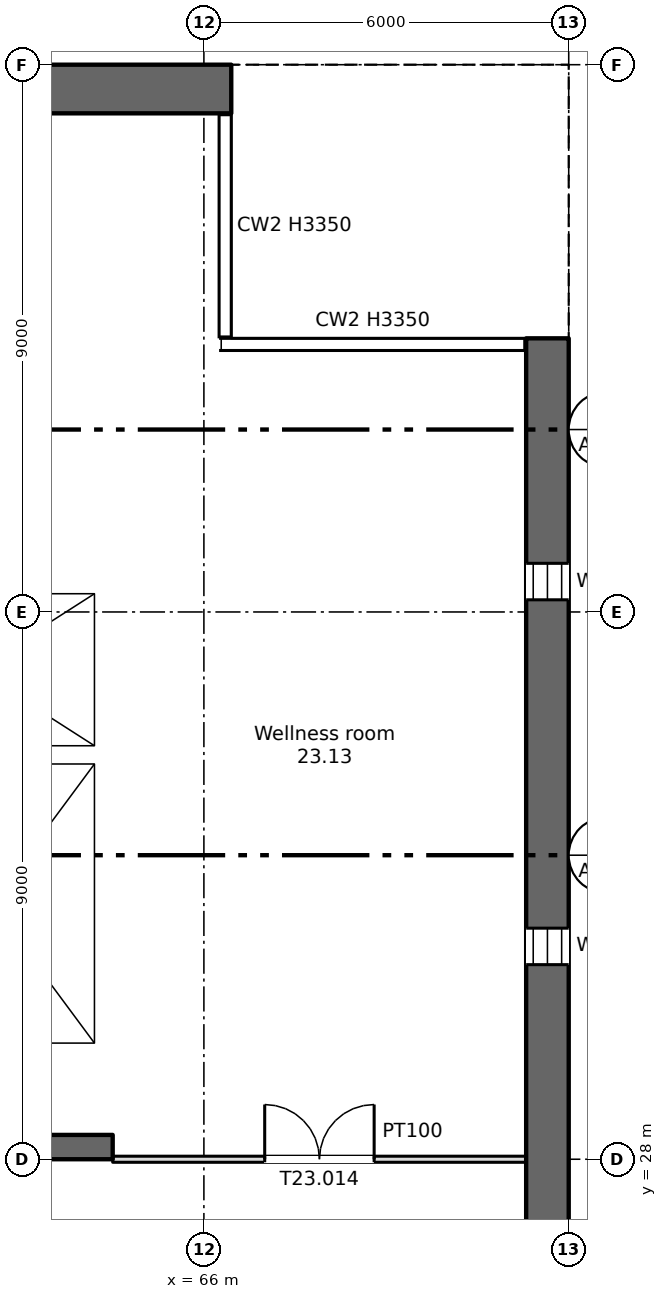
"""IFC4 building model, lengths in metres.
Left out: names, types, materials, properties, quantities, classifications, styles, units other than length and angle.
Written with IfcOpenShell. Run it as: python <this file> out.ifc"""

import sys

from ifc_helpers import new_model, si_unit, direction, frame, frame_2d, origin, place, context, subcontext, project, spatial, rectangle, extrude, element, fill, save


model = new_model("IFC4")
c1 = context("Model", 3, precision=1e-05, world=origin(), true_north=direction((0.0, 1.0)))
c2 = subcontext(c1, "Body", "Model", "MODEL_VIEW")
j1 = project(units=[si_unit("LENGTHUNIT", "METRE"), si_unit("PLANEANGLEUNIT", "RADIAN")], contexts=[c1])
p1 = place(None, origin())
s1 = spatial("IfcSite", under=j1, at=p1, CompositionType="ELEMENT")
p2 = place(p1, origin())
s2 = spatial("IfcBuilding", under=s1, at=p2, CompositionType="ELEMENT")
p3 = place(p2, frame((0.0, 0.0, 151.25)))
s3 = spatial("IfcBuildingStorey", under=s2, at=p3, CompositionType="ELEMENT", Elevation=151.25)
p4 = place(p3, frame((71.65, 6.0, 0.0), z_axis=(0.0, 0.0, 1.0), x_axis=(0.0, 1.0, 0.0)))
e1 = element("IfcWall", 1, at=p4, inside=s3, PredefinedType="SHEAR", context=c2, shape_type="SweptSolid", body=[
    extrude(rectangle(XDim=35.5, YDim=0.7, at=frame_2d((17.75, 0.0))), origin(), (0.0, 0.0, 1.0), 3.35),
])
p5 = place(p4, frame((1.2, 0.0, 0.6)))
e2 = element("IfcOpeningElement", 2, at=p5, cuts=e1, PredefinedType="OPENING", context=c2, shape_type="SweptSolid", body=[
    extrude(rectangle(XDim=0.6, YDim=2.4, at=frame_2d((0.3, 1.2))), frame((0.0, 0.36, 0.0), z_axis=(0.0, -1.0, 0.0), x_axis=(1.0, 0.0, 0.0)), (0.0, 0.0, 1.0), 0.72),
])
p6 = place(p4, frame((7.2, 0.0, 0.6)))
e3 = element("IfcOpeningElement", 3, at=p6, cuts=e1, PredefinedType="OPENING", context=c2, shape_type="SweptSolid", body=[
    extrude(rectangle(XDim=0.6, YDim=2.4, at=frame_2d((0.3, 1.2))), frame((0.0, 0.36, 0.0), z_axis=(0.0, -1.0, 0.0), x_axis=(1.0, 0.0, 0.0)), (0.0, 0.0, 1.0), 0.72),
])
p7 = place(p4, frame((13.2, 0.0, 0.6)))
e4 = element("IfcOpeningElement", 4, at=p7, cuts=e1, PredefinedType="OPENING", context=c2, shape_type="SweptSolid", body=[
    extrude(rectangle(XDim=0.6, YDim=2.4, at=frame_2d((0.3, 1.2))), frame((0.0, 0.36, 0.0), z_axis=(0.0, -1.0, 0.0), x_axis=(1.0, 0.0, 0.0)), (0.0, 0.0, 1.0), 0.72),
])
p8 = place(p4, frame((19.2, 0.0, 0.6)))
e5 = element("IfcOpeningElement", 5, at=p8, cuts=e1, PredefinedType="OPENING", context=c2, shape_type="SweptSolid", body=[
    extrude(rectangle(XDim=0.6, YDim=2.4, at=frame_2d((0.3, 1.2))), frame((0.0, 0.36, 0.0), z_axis=(0.0, -1.0, 0.0), x_axis=(1.0, 0.0, 0.0)), (0.0, 0.0, 1.0), 0.72),
])
p9 = place(p4, frame((25.2, 0.0, 0.6)))
e6 = element("IfcOpeningElement", 6, at=p9, cuts=e1, PredefinedType="OPENING", context=c2, shape_type="SweptSolid", body=[
    extrude(rectangle(XDim=0.6, YDim=2.4, at=frame_2d((0.3, 1.2))), frame((0.0, 0.36, 0.0), z_axis=(0.0, -1.0, 0.0), x_axis=(1.0, 0.0, 0.0)), (0.0, 0.0, 1.0), 0.72),
])
p10 = place(p4, frame((31.2, 0.0, 0.6)))
e7 = element("IfcOpeningElement", 7, at=p10, cuts=e1, PredefinedType="OPENING", context=c2, shape_type="SweptSolid", body=[
    extrude(rectangle(XDim=0.6, YDim=2.4, at=frame_2d((0.3, 1.2))), frame((0.0, 0.36, 0.0), z_axis=(0.0, -1.0, 0.0), x_axis=(1.0, 0.0, 0.0)), (0.0, 0.0, 1.0), 0.72),
])
p11 = place(p3, frame((5.55, 45.6, 0.0), z_axis=(0.0, 0.0, 1.0), x_axis=(1.0, 0.0, 0.0)))
e8 = element("IfcWall", 8, at=p11, inside=s3, PredefinedType="SHEAR", context=c2, shape_type="SweptSolid", body=[
    extrude(rectangle(XDim=60.9, YDim=0.8, at=frame_2d((30.45, 0.0))), origin(), (0.0, 0.0, 1.0), 3.35),
])
p12 = place(p11, frame((1.2, 0.0, 0.6)))
e9 = element("IfcOpeningElement", 9, at=p12, cuts=e8, PredefinedType="OPENING", context=c2, shape_type="SweptSolid", body=[
    extrude(rectangle(XDim=0.6, YDim=2.4, at=frame_2d((0.3, 1.2))), frame((0.0, 0.41, 0.0), z_axis=(0.0, -1.0, 0.0), x_axis=(1.0, 0.0, 0.0)), (0.0, 0.0, 1.0), 0.82),
])
p13 = place(p11, frame((7.2, 0.0, 0.6)))
e10 = element("IfcOpeningElement", 10, at=p13, cuts=e8, PredefinedType="OPENING", context=c2, shape_type="SweptSolid", body=[
    extrude(rectangle(XDim=0.6, YDim=2.4, at=frame_2d((0.3, 1.2))), frame((0.0, 0.41, 0.0), z_axis=(0.0, -1.0, 0.0), x_axis=(1.0, 0.0, 0.0)), (0.0, 0.0, 1.0), 0.82),
])
p14 = place(p3, frame((6.7, 28.2, 0.0), z_axis=(0.0, 0.0, 1.0), x_axis=(1.0, 0.0, 0.0)))
e11 = element("IfcWall", 11, at=p14, inside=s3, PredefinedType="SHEAR", context=c2, shape_type="SweptSolid", body=[
    extrude(rectangle(XDim=57.8, YDim=0.4, at=frame_2d((28.9, 0.0))), origin(), (0.0, 0.0, 1.0), 3.35),
])
p15 = place(p14, frame((13.85, 0.0, 0.0)))
e12 = element("IfcOpeningElement", 12, at=p15, cuts=e11, PredefinedType="OPENING", context=c2, shape_type="SweptSolid", body=[
    extrude(rectangle(XDim=0.9, YDim=2.1, at=frame_2d((0.45, 1.05))), frame((0.0, 0.21, 0.0), z_axis=(0.0, -1.0, 0.0), x_axis=(1.0, 0.0, 0.0)), (0.0, 0.0, 1.0), 0.42),
])
p16 = place(p14, frame((48.562, 0.0, 0.0)))
e13 = element("IfcOpeningElement", 13, at=p16, cuts=e11, PredefinedType="OPENING", context=c2, shape_type="SweptSolid", body=[
    extrude(rectangle(XDim=0.9, YDim=2.1, at=frame_2d((0.45, 1.05))), frame((0.0, 0.21, 0.0), z_axis=(0.0, -1.0, 0.0), x_axis=(1.0, 0.0, 0.0)), (0.0, 0.0, 1.0), 0.42),
])
p17 = place(p14, frame((51.137, 0.0, 0.0)))
e14 = element("IfcOpeningElement", 14, at=p17, cuts=e11, PredefinedType="OPENING", context=c2, shape_type="SweptSolid", body=[
    extrude(rectangle(XDim=0.9, YDim=2.1, at=frame_2d((0.45, 1.05))), frame((0.0, 0.21, 0.0), z_axis=(0.0, -1.0, 0.0), x_axis=(1.0, 0.0, 0.0)), (0.0, 0.0, 1.0), 0.42),
])
p18 = place(p14, frame((1.35, 0.0, 0.0)))
e15 = element("IfcOpeningElement", 15, at=p18, cuts=e11, PredefinedType="OPENING", context=c2, shape_type="SweptSolid", body=[
    extrude(rectangle(XDim=0.9, YDim=2.1, at=frame_2d((0.45, 1.05))), frame((0.0, 0.21, 0.0), z_axis=(0.0, -1.0, 0.0), x_axis=(1.0, 0.0, 0.0)), (0.0, 0.0, 1.0), 0.42),
])
p19 = place(p14, frame((4.7, 0.0, 0.0)))
e16 = element("IfcOpeningElement", 16, at=p19, cuts=e11, PredefinedType="OPENING", context=c2, shape_type="SweptSolid", body=[
    extrude(rectangle(XDim=1.2, YDim=2.1, at=frame_2d((0.6, 1.05))), frame((0.0, 0.21, 0.0), z_axis=(0.0, -1.0, 0.0), x_axis=(1.0, 0.0, 0.0)), (0.0, 0.0, 1.0), 0.42),
])
p20 = place(p14, frame((31.7, 0.0, 0.0)))
e17 = element("IfcOpeningElement", 17, at=p20, cuts=e11, PredefinedType="OPENING", context=c2, shape_type="SweptSolid", body=[
    extrude(rectangle(XDim=1.2, YDim=2.1, at=frame_2d((0.6, 1.05))), frame((0.0, 0.21, 0.0), z_axis=(0.0, -1.0, 0.0), x_axis=(1.0, 0.0, 0.0)), (0.0, 0.0, 1.0), 0.42),
])
p21 = place(p14, frame((55.2, 0.0, 0.0)))
e18 = element("IfcOpeningElement", 18, at=p21, cuts=e11, PredefinedType="OPENING", context=c2, shape_type="SweptSolid", body=[
    extrude(rectangle(XDim=1.2, YDim=2.1, at=frame_2d((0.6, 1.05))), frame((0.0, 0.21, 0.0), z_axis=(0.0, -1.0, 0.0), x_axis=(1.0, 0.0, 0.0)), (0.0, 0.0, 1.0), 0.42),
])
p22 = place(p14, frame((21.7, 0.0, 0.0)))
e19 = element("IfcOpeningElement", 19, at=p22, cuts=e11, PredefinedType="OPENING", context=c2, shape_type="SweptSolid", body=[
    extrude(rectangle(XDim=1.2, YDim=2.1, at=frame_2d((0.6, 1.05))), frame((0.0, 0.21, 0.0), z_axis=(0.0, -1.0, 0.0), x_axis=(1.0, 0.0, 0.0)), (0.0, 0.0, 1.0), 0.42),
])
p23 = place(p14, frame((41.7, 0.0, 0.0)))
e20 = element("IfcOpeningElement", 20, at=p23, cuts=e11, PredefinedType="OPENING", context=c2, shape_type="SweptSolid", body=[
    extrude(rectangle(XDim=1.2, YDim=2.1, at=frame_2d((0.6, 1.05))), frame((0.0, 0.21, 0.0), z_axis=(0.0, -1.0, 0.0), x_axis=(1.0, 0.0, 0.0)), (0.0, 0.0, 1.0), 0.42),
])
p24 = place(p14, frame((24.85, 0.0, 0.0)))
e21 = element("IfcOpeningElement", 21, at=p24, cuts=e11, PredefinedType="OPENING", context=c2, shape_type="SweptSolid", body=[
    extrude(rectangle(XDim=2.4, YDim=2.1, at=frame_2d((1.2, 1.05))), frame((0.0, 0.21, 0.0), z_axis=(0.0, -1.0, 0.0), x_axis=(1.0, 0.0, 0.0)), (0.0, 0.0, 1.0), 0.42),
])
p25 = place(p14, frame((37.35, 0.0, 0.0)))
e22 = element("IfcOpeningElement", 22, at=p25, cuts=e11, PredefinedType="OPENING", context=c2, shape_type="SweptSolid", body=[
    extrude(rectangle(XDim=2.4, YDim=2.1, at=frame_2d((1.2, 1.05))), frame((0.0, 0.21, 0.0), z_axis=(0.0, -1.0, 0.0), x_axis=(1.0, 0.0, 0.0)), (0.0, 0.0, 1.0), 0.42),
])
p26 = place(p14, frame((7.95, 0.0, 0.0)))
e23 = element("IfcOpeningElement", 23, at=p26, cuts=e11, PredefinedType="OPENING", context=c2, shape_type="SweptSolid", body=[
    extrude(rectangle(XDim=2.4, YDim=2.1, at=frame_2d((1.2, 1.05))), frame((0.0, 0.21, 0.0), z_axis=(0.0, -1.0, 0.0), x_axis=(1.0, 0.0, 0.0)), (0.0, 0.0, 1.0), 0.42),
])
p27 = place(p14, frame((28.85, 0.0, 0.0)))
e24 = element("IfcOpeningElement", 24, at=p27, cuts=e11, PredefinedType="OPENING", context=c2, shape_type="SweptSolid", body=[
    extrude(rectangle(XDim=0.9, YDim=2.1, at=frame_2d((0.45, 1.05))), frame((0.0, 0.21, 0.0), z_axis=(0.0, -1.0, 0.0), x_axis=(1.0, 0.0, 0.0)), (0.0, 0.0, 1.0), 0.42),
])
p28 = place(p14, frame((34.85, 0.0, 0.0)))
e25 = element("IfcOpeningElement", 25, at=p28, cuts=e11, PredefinedType="OPENING", context=c2, shape_type="SweptSolid", body=[
    extrude(rectangle(XDim=0.9, YDim=2.1, at=frame_2d((0.45, 1.05))), frame((0.0, 0.21, 0.0), z_axis=(0.0, -1.0, 0.0), x_axis=(1.0, 0.0, 0.0)), (0.0, 0.0, 1.0), 0.42),
])
p29 = place(p3, frame((64.35, 34.8, 0.0), z_axis=(0.0, 0.0, 1.0), x_axis=(0.0, 1.0, 0.0)))
e26 = element("IfcWall", 26, at=p29, inside=s3, PredefinedType="SHEAR", context=c2, shape_type="SweptSolid", body=[
    extrude(rectangle(XDim=10.4, YDim=0.3, at=frame_2d((5.2, 0.0))), origin(), (0.0, 0.0, 1.0), 3.35),
])
p30 = place(p3, frame((64.35, 28.4, 0.0), z_axis=(0.0, 0.0, 1.0), x_axis=(0.0, 1.0, 0.0)))
e27 = element("IfcWall", 27, at=p30, inside=s3, PredefinedType="SHEAR", context=c2, shape_type="SweptSolid", body=[
    extrude(rectangle(XDim=6.1, YDim=0.3, at=frame_2d((3.05, 0.0))), origin(), (0.0, 0.0, 1.0), 3.35),
])
p31 = place(p3, frame((60.3, 34.65, 0.0), z_axis=(0.0, 0.0, 1.0), x_axis=(1.0, 0.0, 0.0)))
e28 = element("IfcWall", 28, at=p31, inside=s3, PredefinedType="SHEAR", context=c2, shape_type="SweptSolid", body=[
    extrude(rectangle(XDim=4.2, YDim=0.3, at=frame_2d((2.1, 0.0))), origin(), (0.0, 0.0, 1.0), 3.35),
])
p32 = place(p3, frame((60.3, 37.45, 0.0), z_axis=(0.0, 0.0, 1.0), x_axis=(1.0, 0.0, 0.0)))
e29 = element("IfcWall", 29, at=p32, inside=s3, PredefinedType="SHEAR", context=c2, shape_type="SweptSolid", body=[
    extrude(rectangle(XDim=3.9, YDim=0.3, at=frame_2d((1.95, 0.0))), origin(), (0.0, 0.0, 1.0), 3.35),
])
p33 = place(p32, frame((1.4, 0.0, 0.0)))
e30 = element("IfcOpeningElement", 30, at=p33, cuts=e29, PredefinedType="OPENING", context=c2, shape_type="SweptSolid", body=[
    extrude(rectangle(XDim=1.1, YDim=2.1, at=frame_2d((0.55, 1.05))), frame((0.0, 0.16, 0.0), z_axis=(0.0, -1.0, 0.0), x_axis=(1.0, 0.0, 0.0)), (0.0, 0.0, 1.0), 0.32),
])
p34 = place(p3, frame((64.5, 28.0, 0.0), z_axis=(0.0, 0.0, 1.0), x_axis=(1.0, 0.0, 0.0)))
e31 = element("IfcWall", 31, at=p34, inside=s3, PredefinedType="PARTITIONING", context=c2, shape_type="SweptSolid", body=[
    extrude(rectangle(XDim=6.8, YDim=0.1, at=frame_2d((3.4, 0.0))), origin(), (0.0, 0.0, 1.0), 3.35),
])
p35 = place(p34, frame((2.5, 0.0, 0.0)))
e32 = element("IfcOpeningElement", 32, at=p35, cuts=e31, PredefinedType="OPENING", context=c2, shape_type="SweptSolid", body=[
    extrude(rectangle(XDim=1.8, YDim=2.1, at=frame_2d((0.9, 1.05))), frame((0.0, 0.06, 0.0), z_axis=(0.0, -1.0, 0.0), x_axis=(1.0, 0.0, 0.0)), (0.0, 0.0, 1.0), 0.12),
])
p36 = place(p9, origin())
e33 = element("IfcWindow", 33, at=p36, inside=s3, PartitioningType="SINGLE_PANEL", PredefinedType="WINDOW", context=c2, shape_type="SweptSolid", body=[
    extrude(rectangle(XDim=0.6, YDim=2.4, at=frame_2d((0.3, 1.2))), frame((0.0, 0.03, 0.0), z_axis=(0.0, -1.0, 0.0), x_axis=(1.0, 0.0, 0.0)), (0.0, 0.0, 1.0), 0.06),
])
fill(e6, e33)
p37 = place(p10, origin())
e34 = element("IfcWindow", 34, at=p37, inside=s3, PartitioningType="SINGLE_PANEL", PredefinedType="WINDOW", context=c2, shape_type="SweptSolid", body=[
    extrude(rectangle(XDim=0.6, YDim=2.4, at=frame_2d((0.3, 1.2))), frame((0.0, 0.03, 0.0), z_axis=(0.0, -1.0, 0.0), x_axis=(1.0, 0.0, 0.0)), (0.0, 0.0, 1.0), 0.06),
])
fill(e7, e34)
p38 = place(p35, origin())
e35 = element("IfcDoor", 35, at=p38, inside=s3, OperationType="DOUBLE_DOOR_SINGLE_SWING", PredefinedType="DOOR", context=c2, shape_type="SweptSolid", body=[
    extrude(rectangle(XDim=1.8, YDim=2.1, at=frame_2d((0.9, 1.05))), frame((0.0, 0.025, 0.0), z_axis=(0.0, -1.0, 0.0), x_axis=(1.0, 0.0, 0.0)), (0.0, 0.0, 1.0), 0.05),
])
fill(e32, e35)
save(model, sys.argv[1])
